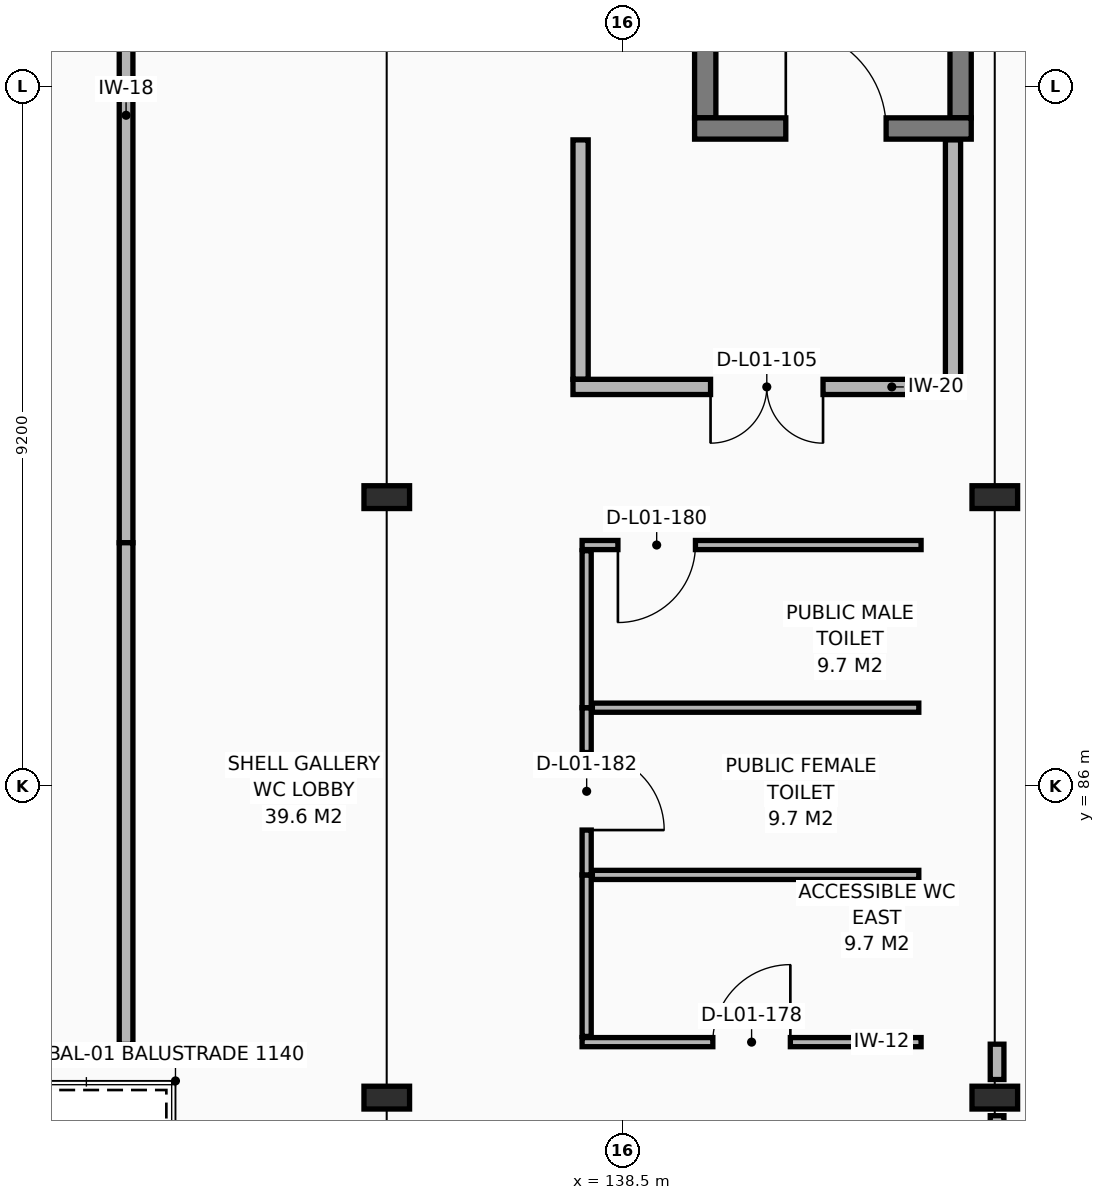
"""IFC4 building model, lengths in metres.
Left out: names, types, materials, properties, quantities, classifications, styles, units other than length and angle.
Written with IfcOpenShell. Run it as: python <this file> out.ifc"""

import sys

from ifc_helpers import new_model, si_unit, direction, frame, frame_2d, origin, origin_2d, place, context, subcontext, project, spatial, rectangle, i_section, extrude, element, fill, save


model = new_model("IFC4")
c1 = context("Model", 3, precision=1e-05, world=origin(), true_north=direction((0.0, 1.0)))
c2 = subcontext(c1, "Body", "Model", "MODEL_VIEW")
j1 = project(units=[si_unit("LENGTHUNIT", "METRE"), si_unit("PLANEANGLEUNIT", "RADIAN")], contexts=[c1])
p1 = place(None, origin())
s1 = spatial("IfcSite", under=j1, at=p1, CompositionType="ELEMENT")
p2 = place(p1, origin())
s2 = spatial("IfcBuilding", under=s1, at=p2, CompositionType="ELEMENT")
p3 = place(p2, frame((0.0, 0.0, 5.1)))
s3 = spatial("IfcBuildingStorey", under=s2, at=p3, CompositionType="ELEMENT", Elevation=5.1)
for number, where, z_axis, x_axis in (
    (1, (135.4, 81.9, 0.0), (0.0, 0.0, 1.0), (1.0, 0.0, 0.0)),
    (2, (135.4, 89.8, 0.0), (0.0, 0.0, 1.0), (1.0, 0.0, 0.0)),
    (3, (143.4, 81.9, 0.0), (0.0, 0.0, 1.0), (1.0, 0.0, 0.0)),
    (4, (143.4, 89.8, 0.0), (0.0, 0.0, 1.0), (1.0, 0.0, 0.0)),
):
    element("IfcColumn", number, at=place(p3, frame(where, z_axis=z_axis, x_axis=x_axis)), inside=s3, PredefinedType="COLUMN", context=c2, shape_type="SweptSolid", body=[
        extrude(i_section(OverallWidth=0.3, OverallDepth=0.6, WebThickness=0.015, FlangeThickness=0.03, FilletRadius=0.027, at=origin_2d()), origin(), (0.0, 0.0, 1.0), 4.42),
    ])
for number, where, z_axis, x_axis in (
    (5, (142.95, 94.79, 0.0), (0.0, 0.0, 1.0), (0.0, 1.0, 0.0)),
    (6, (139.59, 102.49, 0.0), (0.0, 0.0, 1.0), (0.0, -1.0, 0.0)),
):
    element("IfcWall", number, at=place(p3, frame(where, z_axis=z_axis, x_axis=x_axis)), inside=s3, PredefinedType="SHEAR", context=c2, shape_type="SweptSolid", body=[
        extrude(rectangle(XDim=7.7, YDim=0.28, at=frame_2d((3.85, 0.0))), origin(), (0.0, 0.0, 1.0), 4.17),
    ])
p4 = place(p3, frame((139.45, 94.65, 0.0), z_axis=(0.0, 0.0, 1.0), x_axis=(1.0, 0.0, 0.0)))
e7 = element("IfcWall", 7, at=p4, inside=s3, PredefinedType="SHEAR", context=c2, shape_type="SweptSolid", body=[
    extrude(rectangle(XDim=3.64, YDim=0.28, at=frame_2d((1.82, 0.0))), origin(), (0.0, 0.0, 1.0), 4.17),
])
p5 = place(p4, frame((1.2, 0.0, 0.0)))
e8 = element("IfcOpeningElement", 8, at=p5, cuts=e7, PredefinedType="OPENING", context=c2, shape_type="SweptSolid", body=[
    extrude(rectangle(XDim=1.32, YDim=2.12, at=frame_2d((0.66, 1.06))), frame((0.0, 0.15, 0.0), z_axis=(0.0, -1.0, 0.0), x_axis=(1.0, 0.0, 0.0)), (0.0, 0.0, 1.0), 0.3),
])
for number, where, z_axis, x_axis in (
    (9, (142.85, 91.35, 0.0), (0.0, 0.0, 1.0), (0.0, 1.0, 0.0)),
    (10, (137.95, 94.5, 0.0), (0.0, 0.0, 1.0), (0.0, -1.0, 0.0)),
):
    element("IfcWall", number, at=place(p3, frame(where, z_axis=z_axis, x_axis=x_axis)), inside=s3, PredefinedType="PARTITIONING", context=c2, shape_type="SweptSolid", body=[
        extrude(rectangle(XDim=3.15, YDim=0.2, at=frame_2d((1.575, 0.0))), origin(), (0.0, 0.0, 1.0), 4.17),
    ])
p6 = place(p3, frame((142.95, 91.25, 0.0), z_axis=(0.0, 0.0, 1.0), x_axis=(-1.0, 0.0, 0.0)))
e11 = element("IfcWall", 11, at=p6, inside=s3, PredefinedType="PARTITIONING", context=c2, shape_type="SweptSolid", body=[
    extrude(rectangle(XDim=5.1, YDim=0.2, at=frame_2d((2.55, 0.0))), origin(), (0.0, 0.0, 1.0), 4.17),
])
p7 = place(p6, frame((1.81, 0.0, 0.0)))
e12 = element("IfcOpeningElement", 12, at=p7, cuts=e11, PredefinedType="OPENING", context=c2, shape_type="SweptSolid", body=[
    extrude(rectangle(XDim=1.48, YDim=2.15, at=frame_2d((0.74, 1.075))), frame((0.0, 0.11, 0.0), z_axis=(0.0, -1.0, 0.0), x_axis=(1.0, 0.0, 0.0)), (0.0, 0.0, 1.0), 0.22),
])
p8 = place(p3, frame((137.97, 82.63, 0.0), z_axis=(0.0, 0.0, 1.0), x_axis=(1.0, 0.0, 0.0)))
e13 = element("IfcWall", 13, at=p8, inside=s3, PredefinedType="PARTITIONING", context=c2, shape_type="SweptSolid", body=[
    extrude(rectangle(XDim=4.46, YDim=0.12, at=frame_2d((2.23, 0.0))), origin(), (0.0, 0.0, 1.0), 4.16),
])
p9 = place(p8, frame((1.72, 0.0, 0.0)))
e14 = element("IfcOpeningElement", 14, at=p9, cuts=e13, PredefinedType="OPENING", context=c2, shape_type="SweptSolid", body=[
    extrude(rectangle(XDim=1.02, YDim=2.12, at=frame_2d((0.51, 1.06))), frame((0.0, 0.07, 0.0), z_axis=(0.0, -1.0, 0.0), x_axis=(1.0, 0.0, 0.0)), (0.0, 0.0, 1.0), 0.14),
])
p10 = place(p3, frame((143.43, 81.662, 0.0), z_axis=(0.0, 0.0, 1.0), x_axis=(0.0, -1.0, 0.0)))
e15 = element("IfcWall", 15, at=p10, inside=s3, PredefinedType="PARTITIONING", context=c2, shape_type="SweptSolid", body=[
    extrude(rectangle(XDim=7.424, YDim=0.18, at=frame_2d((3.712, 0.0))), origin(), (0.0, 0.0, 1.0), 3.15),
])
p11 = place(p10, frame((3.002, 0.0, 0.0)))
e16 = element("IfcOpeningElement", 16, at=p11, cuts=e15, PredefinedType="OPENING", context=c2, shape_type="SweptSolid", body=[
    extrude(rectangle(XDim=1.42, YDim=2.18, at=frame_2d((0.71, 1.09))), frame((0.0, 0.1, 0.0), z_axis=(0.0, -1.0, 0.0), x_axis=(1.0, 0.0, 0.0)), (0.0, 0.0, 1.0), 0.2),
])
p12 = place(p3, frame((143.43, 82.603, 0.0), z_axis=(0.0, 0.0, 1.0), x_axis=(0.0, -1.0, 0.0)))
e17 = element("IfcWall", 17, at=p12, inside=s3, PredefinedType="PARTITIONING", context=c2, shape_type="SweptSolid", body=[
    extrude(rectangle(XDim=0.465, YDim=0.18, at=frame_2d((0.232, 0.0))), origin(), (0.0, 0.0, 1.0), 3.15),
])
p13 = place(p3, frame((142.43, 89.17, 0.0), z_axis=(0.0, 0.0, 1.0), x_axis=(-1.0, 0.0, 0.0)))
e18 = element("IfcWall", 18, at=p13, inside=s3, PredefinedType="PARTITIONING", context=c2, shape_type="SweptSolid", body=[
    extrude(rectangle(XDim=4.46, YDim=0.12, at=frame_2d((2.23, 0.0))), origin(), (0.0, 0.0, 1.0), 4.16),
])
p14 = place(p13, frame((2.969, 0.0, 0.0)))
e19 = element("IfcOpeningElement", 19, at=p14, cuts=e18, PredefinedType="OPENING", context=c2, shape_type="SweptSolid", body=[
    extrude(rectangle(XDim=1.02, YDim=2.12, at=frame_2d((0.51, 1.06))), frame((0.0, 0.07, 0.0), z_axis=(0.0, -1.0, 0.0), x_axis=(1.0, 0.0, 0.0)), (0.0, 0.0, 1.0), 0.14),
])
p15 = place(p3, frame((131.97, 89.2, 0.0), z_axis=(0.0, 0.0, 1.0), x_axis=(0.0, 1.0, 0.0)))
e20 = element("IfcWall", 20, at=p15, inside=s3, PredefinedType="PARTITIONING", context=c2, shape_type="SweptSolid", body=[
    extrude(rectangle(XDim=23.916, YDim=0.18, at=frame_2d((11.958, 0.0))), origin(), (0.0, 0.0, 1.0), 3.15),
])
p16 = place(p15, frame((11.248, 0.0, 0.0)))
e21 = element("IfcOpeningElement", 21, at=p16, cuts=e20, PredefinedType="OPENING", context=c2, shape_type="SweptSolid", body=[
    extrude(rectangle(XDim=1.42, YDim=2.18, at=frame_2d((0.71, 1.09))), frame((0.0, 0.1, 0.0), z_axis=(0.0, -1.0, 0.0), x_axis=(1.0, 0.0, 0.0)), (0.0, 0.0, 1.0), 0.2),
])
p17 = place(p3, frame((138.03, 84.83, 0.0), z_axis=(0.0, 0.0, 1.0), x_axis=(0.0, -1.0, 0.0)))
e22 = element("IfcWall", 22, at=p17, inside=s3, PredefinedType="PARTITIONING", context=c2, shape_type="SweptSolid", body=[
    extrude(rectangle(XDim=2.125, YDim=0.12, at=frame_2d((1.062, 0.0))), origin(), (0.0, 0.0, 1.0), 4.16),
])
p18 = place(p3, frame((138.03, 87.03, 0.0), z_axis=(0.0, 0.0, 1.0), x_axis=(0.0, -1.0, 0.0)))
e23 = element("IfcWall", 23, at=p18, inside=s3, PredefinedType="PARTITIONING", context=c2, shape_type="SweptSolid", body=[
    extrude(rectangle(XDim=2.2, YDim=0.12, at=frame_2d((1.1, 0.0))), origin(), (0.0, 0.0, 1.0), 4.16),
])
p19 = place(p18, frame((0.59, 0.0, 0.0)))
e24 = element("IfcOpeningElement", 24, at=p19, cuts=e23, PredefinedType="OPENING", context=c2, shape_type="SweptSolid", body=[
    extrude(rectangle(XDim=1.02, YDim=2.12, at=frame_2d((0.51, 1.06))), frame((0.0, 0.07, 0.0), z_axis=(0.0, -1.0, 0.0), x_axis=(1.0, 0.0, 0.0)), (0.0, 0.0, 1.0), 0.14),
])
p20 = place(p3, frame((138.03, 89.095, 0.0), z_axis=(0.0, 0.0, 1.0), x_axis=(0.0, -1.0, 0.0)))
e25 = element("IfcWall", 25, at=p20, inside=s3, PredefinedType="PARTITIONING", context=c2, shape_type="SweptSolid", body=[
    extrude(rectangle(XDim=2.065, YDim=0.12, at=frame_2d((1.032, 0.0))), origin(), (0.0, 0.0, 1.0), 4.16),
])
p21 = place(p3, frame((131.97, 82.6, 0.0), z_axis=(0.0, 0.0, 1.0), x_axis=(0.0, 1.0, 0.0)))
e26 = element("IfcWall", 26, at=p21, inside=s3, PredefinedType="PARTITIONING", context=c2, shape_type="SweptSolid", body=[
    extrude(rectangle(XDim=6.6, YDim=0.18, at=frame_2d((3.3, 0.0))), origin(), (0.0, 0.0, 1.0), 3.55),
])
for number, where, z_axis, x_axis in (
    (27, (138.105, 84.83, 0.0), (0.0, 0.0, 1.0), (1.0, 0.0, 0.0)),
    (28, (138.105, 87.03, 0.0), (0.0, 0.0, 1.0), (1.0, 0.0, 0.0)),
):
    element("IfcWall", number, at=place(p3, frame(where, z_axis=z_axis, x_axis=x_axis)), inside=s3, PredefinedType="PARTITIONING", context=c2, shape_type="SweptSolid", body=[
        extrude(rectangle(XDim=4.295, YDim=0.12, at=frame_2d((2.147, 0.0))), origin(), (0.0, 0.0, 1.0), 4.16),
    ])
p22 = place(p5, origin())
e29 = element("IfcDoor", 29, at=p22, inside=s3, OperationType="SINGLE_SWING_LEFT", PredefinedType="DOOR", context=c2, shape_type="SweptSolid", body=[
    extrude(rectangle(XDim=1.32, YDim=2.12, at=frame_2d((0.66, 1.06))), frame((0.0, 0.025, 0.0), z_axis=(0.0, -1.0, 0.0), x_axis=(1.0, 0.0, 0.0)), (0.0, 0.0, 1.0), 0.05),
])
fill(e8, e29)
p23 = place(p7, origin())
e30 = element("IfcDoor", 30, at=p23, inside=s3, OperationType="DOUBLE_DOOR_SINGLE_SWING", PredefinedType="DOOR", context=c2, shape_type="SweptSolid", body=[
    extrude(rectangle(XDim=1.48, YDim=2.15, at=frame_2d((0.74, 1.075))), frame((0.0, 0.025, 0.0), z_axis=(0.0, -1.0, 0.0), x_axis=(1.0, 0.0, 0.0)), (0.0, 0.0, 1.0), 0.05),
])
fill(e12, e30)
p24 = place(p9, origin())
e31 = element("IfcDoor", 31, at=p24, inside=s3, OperationType="SINGLE_SWING_RIGHT", PredefinedType="DOOR", context=c2, shape_type="SweptSolid", body=[
    extrude(rectangle(XDim=1.02, YDim=2.12, at=frame_2d((0.51, 1.06))), frame((0.0, 0.025, 0.0), z_axis=(0.0, -1.0, 0.0), x_axis=(1.0, 0.0, 0.0)), (0.0, 0.0, 1.0), 0.05),
])
fill(e14, e31)
p25 = place(p14, origin())
e32 = element("IfcDoor", 32, at=p25, inside=s3, OperationType="SINGLE_SWING_RIGHT", PredefinedType="DOOR", context=c2, shape_type="SweptSolid", body=[
    extrude(rectangle(XDim=1.02, YDim=2.12, at=frame_2d((0.51, 1.06))), frame((0.0, 0.025, 0.0), z_axis=(0.0, -1.0, 0.0), x_axis=(1.0, 0.0, 0.0)), (0.0, 0.0, 1.0), 0.05),
])
fill(e19, e32)
p26 = place(p19, origin())
e33 = element("IfcDoor", 33, at=p26, inside=s3, OperationType="SINGLE_SWING_RIGHT", PredefinedType="DOOR", context=c2, shape_type="SweptSolid", body=[
    extrude(rectangle(XDim=1.02, YDim=2.12, at=frame_2d((0.51, 1.06))), frame((0.0, 0.025, 0.0), z_axis=(0.0, -1.0, 0.0), x_axis=(1.0, 0.0, 0.0)), (0.0, 0.0, 1.0), 0.05),
])
fill(e24, e33)
save(model, sys.argv[1])
